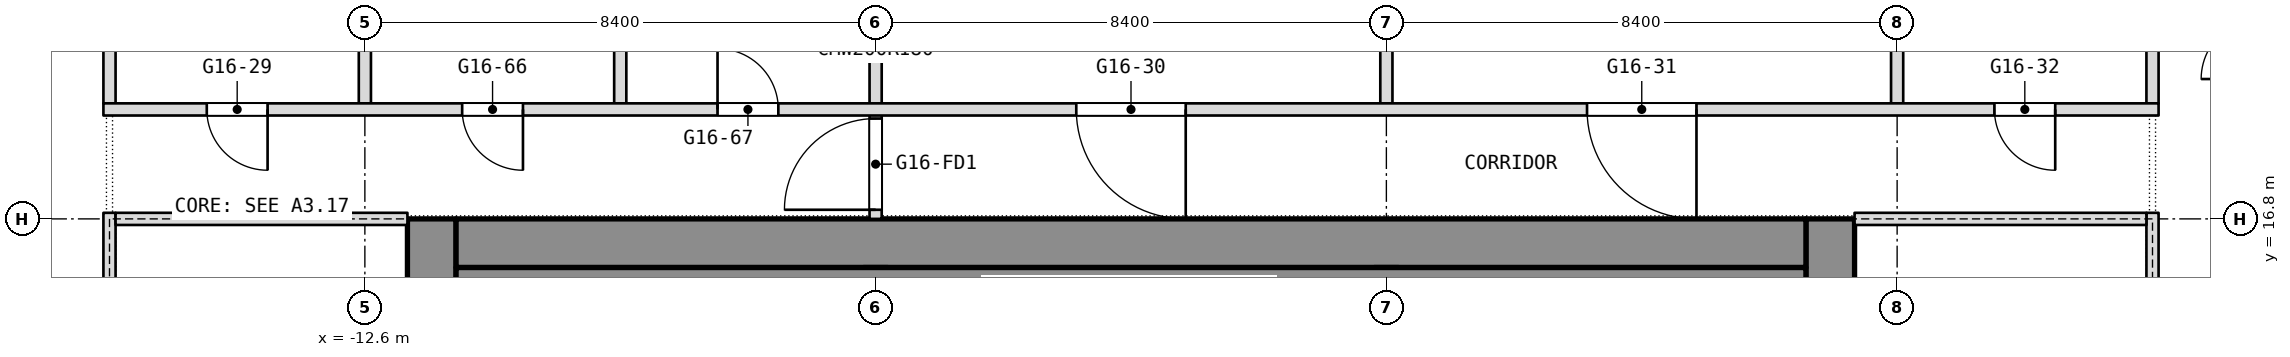
"""IFC4 building model, lengths in metres.
Left out: names, types, materials, properties, quantities, classifications, styles, units other than length and angle.
Written with IfcOpenShell. Run it as: python <this file> out.ifc"""

import sys

from ifc_helpers import new_model, si_unit, direction, frame, frame_2d, origin, place, context, subcontext, project, spatial, rectangle, extrude, element, fill, save


model = new_model("IFC4")
c1 = context("Model", 3, precision=1e-05, world=origin(), true_north=direction((0.0, 1.0)))
c2 = subcontext(c1, "Body", "Model", "MODEL_VIEW")
j1 = project(units=[si_unit("LENGTHUNIT", "METRE"), si_unit("PLANEANGLEUNIT", "RADIAN")], contexts=[c1])
p1 = place(None, origin())
s1 = spatial("IfcSite", under=j1, at=p1, CompositionType="ELEMENT")
p2 = place(p1, origin())
s2 = spatial("IfcBuilding", under=s1, at=p2, CompositionType="ELEMENT")
p3 = place(p2, frame((0.0, 0.0, 198.5)))
s3 = spatial("IfcBuildingStorey", under=s2, at=p3, CompositionType="ELEMENT", Elevation=198.5)
p4 = place(p3, frame((11.5, 0.0, 0.0), z_axis=(0.0, 0.0, 1.0), x_axis=(0.0, 1.0, 0.0)))
e1 = element("IfcWall", 1, at=p4, inside=s3, PredefinedType="SHEAR", context=c2, shape_type="SweptSolid", body=[
    extrude(rectangle(XDim=16.8, YDim=0.8, at=frame_2d((8.4, 0.0))), origin(), (0.0, 0.0, 1.0), 3.6),
])
p5 = place(p4, frame((2.3, 0.0, 0.0)))
e2 = element("IfcOpeningElement", 2, at=p5, cuts=e1, PredefinedType="OPENING", context=c2, shape_type="SweptSolid", body=[
    extrude(rectangle(XDim=1.1, YDim=2.1, at=frame_2d((0.55, 1.05))), frame((0.0, 0.4, 0.0), z_axis=(0.0, -1.0, 0.0), x_axis=(1.0, 0.0, 0.0)), (0.0, 0.0, 1.0), 0.8),
])
p6 = place(p4, frame((4.85, 0.0, 0.0)))
e3 = element("IfcOpeningElement", 3, at=p6, cuts=e1, PredefinedType="OPENING", context=c2, shape_type="SweptSolid", body=[
    extrude(rectangle(XDim=1.1, YDim=2.1, at=frame_2d((0.55, 1.05))), frame((0.0, 0.4, 0.0), z_axis=(0.0, -1.0, 0.0), x_axis=(1.0, 0.0, 0.0)), (0.0, 0.0, 1.0), 0.8),
])
p7 = place(p4, frame((6.825, 0.0, 0.0)))
e4 = element("IfcOpeningElement", 4, at=p7, cuts=e1, PredefinedType="OPENING", context=c2, shape_type="SweptSolid", body=[
    extrude(rectangle(XDim=1.2, YDim=2.1, at=frame_2d((0.6, 1.05))), frame((0.0, 0.4, 0.0), z_axis=(0.0, -1.0, 0.0), x_axis=(1.0, 0.0, 0.0)), (0.0, 0.0, 1.0), 0.8),
])
p8 = place(p4, frame((13.4, 0.0, 0.0)))
e5 = element("IfcOpeningElement", 5, at=p8, cuts=e1, PredefinedType="OPENING", context=c2, shape_type="SweptSolid", body=[
    extrude(rectangle(XDim=1.1, YDim=2.1, at=frame_2d((0.55, 1.05))), frame((0.0, 0.4, 0.0), z_axis=(0.0, -1.0, 0.0), x_axis=(1.0, 0.0, 0.0)), (0.0, 0.0, 1.0), 0.8),
])
p9 = place(p4, frame((10.85, 0.0, 0.0)))
e6 = element("IfcOpeningElement", 6, at=p9, cuts=e1, PredefinedType="OPENING", context=c2, shape_type="SweptSolid", body=[
    extrude(rectangle(XDim=1.1, YDim=2.1, at=frame_2d((0.55, 1.05))), frame((0.0, 0.4, 0.0), z_axis=(0.0, -1.0, 0.0), x_axis=(1.0, 0.0, 0.0)), (0.0, 0.0, 1.0), 0.8),
])
p10 = place(p4, frame((8.775, 0.0, 0.0)))
e7 = element("IfcOpeningElement", 7, at=p10, cuts=e1, PredefinedType="OPENING", context=c2, shape_type="SweptSolid", body=[
    extrude(rectangle(XDim=1.2, YDim=2.1, at=frame_2d((0.6, 1.05))), frame((0.0, 0.4, 0.0), z_axis=(0.0, -1.0, 0.0), x_axis=(1.0, 0.0, 0.0)), (0.0, 0.0, 1.0), 0.8),
])
p11 = place(p3, frame((-11.5, 0.0, 0.0), z_axis=(0.0, 0.0, 1.0), x_axis=(0.0, 1.0, 0.0)))
e8 = element("IfcWall", 8, at=p11, inside=s3, PredefinedType="SHEAR", context=c2, shape_type="SweptSolid", body=[
    extrude(rectangle(XDim=16.8, YDim=0.8, at=frame_2d((8.4, 0.0))), origin(), (0.0, 0.0, 1.0), 3.6),
])
p12 = place(p11, frame((1.837, 0.0, 0.0)))
e9 = element("IfcOpeningElement", 9, at=p12, cuts=e8, PredefinedType="OPENING", context=c2, shape_type="SweptSolid", body=[
    extrude(rectangle(XDim=0.9, YDim=2.1, at=frame_2d((0.45, 1.05))), frame((0.0, 0.4, 0.0), z_axis=(0.0, -1.0, 0.0), x_axis=(1.0, 0.0, 0.0)), (0.0, 0.0, 1.0), 0.8),
])
p13 = place(p11, frame((4.462, 0.0, 0.0)))
e10 = element("IfcOpeningElement", 10, at=p13, cuts=e8, PredefinedType="OPENING", context=c2, shape_type="SweptSolid", body=[
    extrude(rectangle(XDim=0.9, YDim=2.1, at=frame_2d((0.45, 1.05))), frame((0.0, 0.4, 0.0), z_axis=(0.0, -1.0, 0.0), x_axis=(1.0, 0.0, 0.0)), (0.0, 0.0, 1.0), 0.8),
])
p14 = place(p11, frame((6.825, 0.0, 0.0)))
e11 = element("IfcOpeningElement", 11, at=p14, cuts=e8, PredefinedType="OPENING", context=c2, shape_type="SweptSolid", body=[
    extrude(rectangle(XDim=1.2, YDim=2.1, at=frame_2d((0.6, 1.05))), frame((0.0, 0.4, 0.0), z_axis=(0.0, -1.0, 0.0), x_axis=(1.0, 0.0, 0.0)), (0.0, 0.0, 1.0), 0.8),
])
p15 = place(p11, frame((12.3, 0.0, 0.0)))
e12 = element("IfcOpeningElement", 12, at=p15, cuts=e8, PredefinedType="OPENING", context=c2, shape_type="SweptSolid", body=[
    extrude(rectangle(XDim=0.9, YDim=2.1, at=frame_2d((0.45, 1.05))), frame((0.0, 0.4, 0.0), z_axis=(0.0, -1.0, 0.0), x_axis=(1.0, 0.0, 0.0)), (0.0, 0.0, 1.0), 0.8),
])
p16 = place(p11, frame((8.775, 0.0, 0.0)))
e13 = element("IfcOpeningElement", 13, at=p16, cuts=e8, PredefinedType="OPENING", context=c2, shape_type="SweptSolid", body=[
    extrude(rectangle(XDim=1.2, YDim=2.1, at=frame_2d((0.6, 1.05))), frame((0.0, 0.4, 0.0), z_axis=(0.0, -1.0, 0.0), x_axis=(1.0, 0.0, 0.0)), (0.0, 0.0, 1.0), 0.8),
])
p17 = place(p3, frame((-11.1, 16.4, 0.0), z_axis=(0.0, 0.0, 1.0), x_axis=(1.0, 0.0, 0.0)))
e14 = element("IfcWall", 14, at=p17, inside=s3, PredefinedType="SHEAR", context=c2, shape_type="SweptSolid", body=[
    extrude(rectangle(XDim=22.2, YDim=0.8, at=frame_2d((11.1, 0.0))), origin(), (0.0, 0.0, 1.0), 3.6),
])
p18 = place(p3, frame((-4.2, 0.8, 0.0), z_axis=(0.0, 0.0, 1.0), x_axis=(0.0, 1.0, 0.0)))
e15 = element("IfcWall", 15, at=p18, inside=s3, PredefinedType="SHEAR", context=c2, shape_type="SweptSolid", body=[
    extrude(rectangle(XDim=15.2, YDim=0.4, at=frame_2d((7.6, 0.0))), origin(), (0.0, 0.0, 1.0), 3.6),
])
p19 = place(p18, frame((8.5, 0.0, 0.0)))
e16 = element("IfcOpeningElement", 16, at=p19, cuts=e15, PredefinedType="OPENING", context=c2, shape_type="SweptSolid", body=[
    extrude(rectangle(XDim=1.2, YDim=2.1, at=frame_2d((0.6, 1.05))), frame((0.0, 0.2, 0.0), z_axis=(0.0, -1.0, 0.0), x_axis=(1.0, 0.0, 0.0)), (0.0, 0.0, 1.0), 0.4),
])
p20 = place(p3, frame((4.2, 0.8, 0.0), z_axis=(0.0, 0.0, 1.0), x_axis=(0.0, 1.0, 0.0)))
e17 = element("IfcWall", 17, at=p20, inside=s3, PredefinedType="SHEAR", context=c2, shape_type="SweptSolid", body=[
    extrude(rectangle(XDim=15.2, YDim=0.4, at=frame_2d((7.6, 0.0))), origin(), (0.0, 0.0, 1.0), 3.6),
])
p21 = place(p20, frame((5.95, 0.0, 0.0)))
e18 = element("IfcOpeningElement", 18, at=p21, cuts=e17, PredefinedType="OPENING", context=c2, shape_type="SweptSolid", body=[
    extrude(rectangle(XDim=1.2, YDim=2.1, at=frame_2d((0.6, 1.05))), frame((0.0, 0.2, 0.0), z_axis=(0.0, -1.0, 0.0), x_axis=(1.0, 0.0, 0.0)), (0.0, 0.0, 1.0), 0.4),
])
for number, where, z_axis, x_axis in (
    (19, (16.8, 18.7, 0.0), (0.0, 0.0, 1.0), (0.0, 1.0, 0.0)),
    (20, (12.6, 18.7, 0.0), (0.0, 0.0, 1.0), (0.0, 1.0, 0.0)),
    (21, (4.2, 18.7, 0.0), (0.0, 0.0, 1.0), (0.0, 1.0, 0.0)),
):
    element("IfcWall", number, at=place(p3, frame(where, z_axis=z_axis, x_axis=x_axis)), inside=s3, PredefinedType="PARTITIONING", context=c2, shape_type="SweptSolid", body=[
        extrude(rectangle(XDim=3.64, YDim=0.2, at=frame_2d((1.82, 0.0))), origin(), (0.0, 0.0, 1.0), 3.34),
    ])
p22 = place(p3, frame((-4.2, 16.8, 0.0), z_axis=(0.0, 0.0, 1.0), x_axis=(0.0, 1.0, 0.0)))
e22 = element("IfcWall", 22, at=p22, inside=s3, PredefinedType="PARTITIONING", context=c2, shape_type="SweptSolid", body=[
    extrude(rectangle(XDim=5.54, YDim=0.2, at=frame_2d((2.77, 0.0))), origin(), (0.0, 0.0, 1.0), 3.34),
])
p23 = place(p22, frame((0.15, 0.0, 0.0)))
e23 = element("IfcOpeningElement", 23, at=p23, cuts=e22, PredefinedType="OPENING", context=c2, shape_type="SweptSolid", body=[
    extrude(rectangle(XDim=1.5, YDim=2.1, at=frame_2d((0.75, 1.05))), frame((0.0, 0.1, 0.0), z_axis=(0.0, -1.0, 0.0), x_axis=(1.0, 0.0, 0.0)), (0.0, 0.0, 1.0), 0.2),
])
for number, where, z_axis, x_axis in (
    (24, (-8.4, 18.7, 0.0), (0.0, 0.0, 1.0), (0.0, 1.0, 0.0)),
    (25, (-12.6, 18.7, 0.0), (0.0, 0.0, 1.0), (0.0, 1.0, 0.0)),
    (26, (-16.8, 18.7, 0.0), (0.0, 0.0, 1.0), (0.0, 1.0, 0.0)),
):
    element("IfcWall", number, at=place(p3, frame(where, z_axis=z_axis, x_axis=x_axis)), inside=s3, PredefinedType="PARTITIONING", context=c2, shape_type="SweptSolid", body=[
        extrude(rectangle(XDim=3.64, YDim=0.2, at=frame_2d((1.82, 0.0))), origin(), (0.0, 0.0, 1.0), 3.34),
    ])
p24 = place(p3, frame((-16.9, 18.6, 0.0), z_axis=(0.0, 0.0, 1.0), x_axis=(1.0, 0.0, 0.0)))
e27 = element("IfcWall", 27, at=p24, inside=s3, PredefinedType="PARTITIONING", context=c2, shape_type="SweptSolid", body=[
    extrude(rectangle(XDim=33.8, YDim=0.2, at=frame_2d((16.9, 0.0))), origin(), (0.0, 0.0, 1.0), 3.34),
])
p25 = place(p24, frame((1.7, 0.0, 0.0)))
e28 = element("IfcOpeningElement", 28, at=p25, cuts=e27, PredefinedType="OPENING", context=c2, shape_type="SweptSolid", body=[
    extrude(rectangle(XDim=1.0, YDim=2.1, at=frame_2d((0.5, 1.05))), frame((0.0, 0.1, 0.0), z_axis=(0.0, -1.0, 0.0), x_axis=(1.0, 0.0, 0.0)), (0.0, 0.0, 1.0), 0.2),
])
p26 = place(p24, frame((16.0, 0.0, 0.0)))
e29 = element("IfcOpeningElement", 29, at=p26, cuts=e27, PredefinedType="OPENING", context=c2, shape_type="SweptSolid", body=[
    extrude(rectangle(XDim=1.8, YDim=2.1, at=frame_2d((0.9, 1.05))), frame((0.0, 0.1, 0.0), z_axis=(0.0, -1.0, 0.0), x_axis=(1.0, 0.0, 0.0)), (0.0, 0.0, 1.0), 0.2),
])
p27 = place(p24, frame((24.4, 0.0, 0.0)))
e30 = element("IfcOpeningElement", 30, at=p27, cuts=e27, PredefinedType="OPENING", context=c2, shape_type="SweptSolid", body=[
    extrude(rectangle(XDim=1.8, YDim=2.1, at=frame_2d((0.9, 1.05))), frame((0.0, 0.1, 0.0), z_axis=(0.0, -1.0, 0.0), x_axis=(1.0, 0.0, 0.0)), (0.0, 0.0, 1.0), 0.2),
])
p28 = place(p24, frame((31.1, 0.0, 0.0)))
e31 = element("IfcOpeningElement", 31, at=p28, cuts=e27, PredefinedType="OPENING", context=c2, shape_type="SweptSolid", body=[
    extrude(rectangle(XDim=1.0, YDim=2.1, at=frame_2d((0.5, 1.05))), frame((0.0, 0.1, 0.0), z_axis=(0.0, -1.0, 0.0), x_axis=(1.0, 0.0, 0.0)), (0.0, 0.0, 1.0), 0.2),
])
p29 = place(p24, frame((5.9, 0.0, 0.0)))
e32 = element("IfcOpeningElement", 32, at=p29, cuts=e27, PredefinedType="OPENING", context=c2, shape_type="SweptSolid", body=[
    extrude(rectangle(XDim=1.0, YDim=2.1, at=frame_2d((0.5, 1.05))), frame((0.0, 0.1, 0.0), z_axis=(0.0, -1.0, 0.0), x_axis=(1.0, 0.0, 0.0)), (0.0, 0.0, 1.0), 0.2),
])
p30 = place(p24, frame((10.1, 0.0, 0.0)))
e33 = element("IfcOpeningElement", 33, at=p30, cuts=e27, PredefinedType="OPENING", context=c2, shape_type="SweptSolid", body=[
    extrude(rectangle(XDim=1.0, YDim=2.1, at=frame_2d((0.5, 1.05))), frame((0.0, 0.1, 0.0), z_axis=(0.0, -1.0, 0.0), x_axis=(1.0, 0.0, 0.0)), (0.0, 0.0, 1.0), 0.2),
])
p31 = place(p3, frame((-11.1, 15.65, 0.0), z_axis=(0.0, 0.0, 1.0), x_axis=(1.0, 0.0, 0.0)))
e34 = element("IfcWall", 34, at=p31, inside=s3, PredefinedType="PARTITIONING", context=c2, shape_type="SweptSolid", body=[
    extrude(rectangle(XDim=22.2, YDim=0.7, at=frame_2d((11.1, 0.0))), origin(), (0.0, 0.0, 1.0), 3.34),
])
p32 = place(p3, frame((-16.8, -0.1, 0.0), z_axis=(0.0, 0.0, 1.0), x_axis=(0.0, 1.0, 0.0)))
e35 = element("IfcWall", 35, at=p32, inside=s3, PredefinedType="PARTITIONING", context=c2, shape_type="SweptSolid", body=[
    extrude(rectangle(XDim=17.0, YDim=0.2, at=frame_2d((8.5, 0.0))), origin(), (0.0, 0.0, 1.0), 3.34),
])
p33 = place(p32, frame((2.2, 0.0, 0.0)))
e36 = element("IfcOpeningElement", 36, at=p33, cuts=e35, PredefinedType="OPENING", context=c2, shape_type="SweptSolid", body=[
    extrude(rectangle(XDim=1.8, YDim=2.1, at=frame_2d((0.9, 1.05))), frame((0.0, 0.1, 0.0), z_axis=(0.0, -1.0, 0.0), x_axis=(1.0, 0.0, 0.0)), (0.0, 0.0, 1.0), 0.2),
])
p34 = place(p32, frame((13.0, 0.0, 0.0)))
e37 = element("IfcOpeningElement", 37, at=p34, cuts=e35, PredefinedType="OPENING", context=c2, shape_type="SweptSolid", body=[
    extrude(rectangle(XDim=1.8, YDim=2.1, at=frame_2d((0.9, 1.05))), frame((0.0, 0.1, 0.0), z_axis=(0.0, -1.0, 0.0), x_axis=(1.0, 0.0, 0.0)), (0.0, 0.0, 1.0), 0.2),
])
p35 = place(p3, frame((-16.7, 16.8, 0.0), z_axis=(0.0, 0.0, 1.0), x_axis=(1.0, 0.0, 0.0)))
e38 = element("IfcWall", 38, at=p35, inside=s3, PredefinedType="PARTITIONING", context=c2, shape_type="SweptSolid", body=[
    extrude(rectangle(XDim=4.8, YDim=0.2, at=frame_2d((2.4, 0.0))), origin(), (0.0, 0.0, 1.0), 2.94),
])
p36 = place(p3, frame((16.8, -0.1, 0.0), z_axis=(0.0, 0.0, 1.0), x_axis=(0.0, 1.0, 0.0)))
e39 = element("IfcWall", 39, at=p36, inside=s3, PredefinedType="PARTITIONING", context=c2, shape_type="SweptSolid", body=[
    extrude(rectangle(XDim=17.0, YDim=0.2, at=frame_2d((8.5, 0.0))), origin(), (0.0, 0.0, 1.0), 3.34),
])
p37 = place(p36, frame((2.2, 0.0, 0.0)))
e40 = element("IfcOpeningElement", 40, at=p37, cuts=e39, PredefinedType="OPENING", context=c2, shape_type="SweptSolid", body=[
    extrude(rectangle(XDim=1.8, YDim=2.1, at=frame_2d((0.9, 1.05))), frame((0.0, 0.1, 0.0), z_axis=(0.0, -1.0, 0.0), x_axis=(1.0, 0.0, 0.0)), (0.0, 0.0, 1.0), 0.2),
])
p38 = place(p36, frame((13.0, 0.0, 0.0)))
e41 = element("IfcOpeningElement", 41, at=p38, cuts=e39, PredefinedType="OPENING", context=c2, shape_type="SweptSolid", body=[
    extrude(rectangle(XDim=1.8, YDim=2.1, at=frame_2d((0.9, 1.05))), frame((0.0, 0.1, 0.0), z_axis=(0.0, -1.0, 0.0), x_axis=(1.0, 0.0, 0.0)), (0.0, 0.0, 1.0), 0.2),
])
p39 = place(p3, frame((11.9, 16.8, 0.0), z_axis=(0.0, 0.0, 1.0), x_axis=(1.0, 0.0, 0.0)))
e42 = element("IfcWall", 42, at=p39, inside=s3, PredefinedType="PARTITIONING", context=c2, shape_type="SweptSolid", body=[
    extrude(rectangle(XDim=4.8, YDim=0.2, at=frame_2d((2.4, 0.0))), origin(), (0.0, 0.0, 1.0), 2.94),
])
p40 = place(p25, origin())
e43 = element("IfcDoor", 43, at=p40, inside=s3, OperationType="SINGLE_SWING_LEFT", PredefinedType="DOOR", context=c2, shape_type="SweptSolid", body=[
    extrude(rectangle(XDim=1.0, YDim=2.1, at=frame_2d((0.5, 1.05))), frame((0.0, 0.025, 0.0), z_axis=(0.0, -1.0, 0.0), x_axis=(1.0, 0.0, 0.0)), (0.0, 0.0, 1.0), 0.05),
])
fill(e28, e43)
p41 = place(p26, origin())
e44 = element("IfcDoor", 44, at=p41, inside=s3, OperationType="DOUBLE_DOOR_SINGLE_SWING", PredefinedType="DOOR", context=c2, shape_type="SweptSolid", body=[
    extrude(rectangle(XDim=1.8, YDim=2.1, at=frame_2d((0.9, 1.05))), frame((0.0, 0.025, 0.0), z_axis=(0.0, -1.0, 0.0), x_axis=(1.0, 0.0, 0.0)), (0.0, 0.0, 1.0), 0.05),
])
fill(e29, e44)
p42 = place(p27, origin())
e45 = element("IfcDoor", 45, at=p42, inside=s3, OperationType="DOUBLE_DOOR_SINGLE_SWING", PredefinedType="DOOR", context=c2, shape_type="SweptSolid", body=[
    extrude(rectangle(XDim=1.8, YDim=2.1, at=frame_2d((0.9, 1.05))), frame((0.0, 0.025, 0.0), z_axis=(0.0, -1.0, 0.0), x_axis=(1.0, 0.0, 0.0)), (0.0, 0.0, 1.0), 0.05),
])
fill(e30, e45)
p43 = place(p28, origin())
e46 = element("IfcDoor", 46, at=p43, inside=s3, OperationType="SINGLE_SWING_RIGHT", PredefinedType="DOOR", context=c2, shape_type="SweptSolid", body=[
    extrude(rectangle(XDim=1.0, YDim=2.1, at=frame_2d((0.5, 1.05))), frame((0.0, 0.025, 0.0), z_axis=(0.0, -1.0, 0.0), x_axis=(1.0, 0.0, 0.0)), (0.0, 0.0, 1.0), 0.05),
])
fill(e31, e46)
p44 = place(p29, origin())
e47 = element("IfcDoor", 47, at=p44, inside=s3, OperationType="SINGLE_SWING_RIGHT", PredefinedType="DOOR", context=c2, shape_type="SweptSolid", body=[
    extrude(rectangle(XDim=1.0, YDim=2.1, at=frame_2d((0.5, 1.05))), frame((0.0, 0.025, 0.0), z_axis=(0.0, -1.0, 0.0), x_axis=(1.0, 0.0, 0.0)), (0.0, 0.0, 1.0), 0.05),
])
fill(e32, e47)
p45 = place(p30, origin())
e48 = element("IfcDoor", 48, at=p45, inside=s3, OperationType="SINGLE_SWING_LEFT", PredefinedType="DOOR", context=c2, shape_type="SweptSolid", body=[
    extrude(rectangle(XDim=1.0, YDim=2.1, at=frame_2d((0.5, 1.05))), frame((0.0, 0.025, 0.0), z_axis=(0.0, -1.0, 0.0), x_axis=(1.0, 0.0, 0.0)), (0.0, 0.0, 1.0), 0.05),
])
fill(e33, e48)
p46 = place(p23, origin())
e49 = element("IfcDoor", 49, at=p46, inside=s3, OperationType="DOUBLE_DOOR_DOUBLE_SWING", PredefinedType="DOOR", context=c2, shape_type="SweptSolid", body=[
    extrude(rectangle(XDim=1.5, YDim=2.1, at=frame_2d((0.75, 1.05))), frame((0.0, 0.025, 0.0), z_axis=(0.0, -1.0, 0.0), x_axis=(1.0, 0.0, 0.0)), (0.0, 0.0, 1.0), 0.05),
])
fill(e23, e49)
save(model, sys.argv[1])
